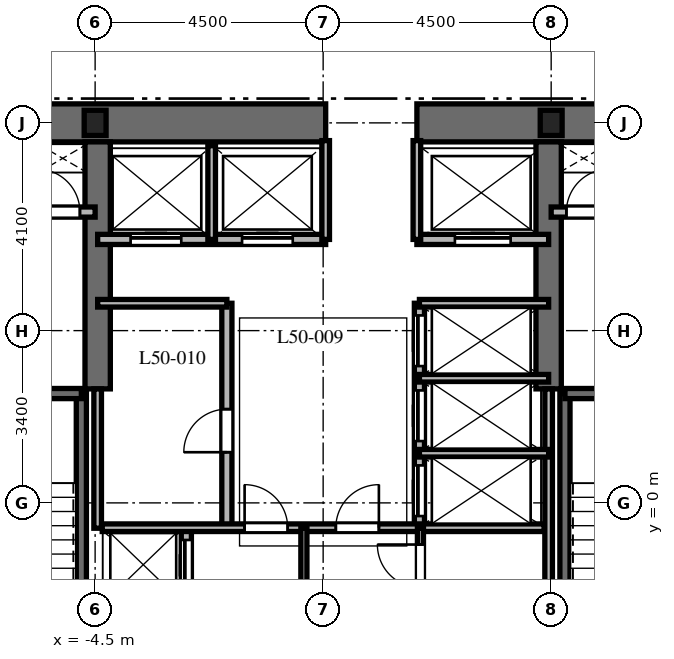
"""IFC4 building model, lengths in metres.
Left out: names, types, materials, properties, quantities, classifications, styles, units other than length and angle.
Written with IfcOpenShell. Run it as: python <this file> out.ifc"""

import sys

from ifc_helpers import new_model, si_unit, direction, frame, frame_2d, origin, origin_2d, place, context, subcontext, project, spatial, rectangle, i_section, extrude, element, fill, save


model = new_model("IFC4")
c1 = context("Model", 3, precision=1e-05, world=origin(), true_north=direction((0.0, 1.0)))
c2 = subcontext(c1, "Body", "Model", "MODEL_VIEW")
j1 = project(units=[si_unit("LENGTHUNIT", "METRE"), si_unit("PLANEANGLEUNIT", "RADIAN")], contexts=[c1])
p1 = place(None, origin())
s1 = spatial("IfcSite", under=j1, at=p1, CompositionType="ELEMENT")
p2 = place(p1, origin())
s2 = spatial("IfcBuilding", under=s1, at=p2, CompositionType="ELEMENT")
p3 = place(p2, frame((0.0, 0.0, 201.5)))
s3 = spatial("IfcBuildingStorey", under=s2, at=p3, CompositionType="ELEMENT", Elevation=201.5)
p4 = place(p3, frame((-9.375, 7.5, 0.0), z_axis=(0.0, 0.0, 1.0), x_axis=(1.0, 0.0, 0.0)))
e1 = element("IfcWall", 1, at=p4, inside=s3, PredefinedType="SHEAR", context=c2, shape_type="SweptSolid", body=[
    extrude(rectangle(XDim=9.425, YDim=0.75, at=frame_2d((4.712, 0.0))), origin(), (0.0, 0.0, 1.0), 5.0),
])
p5 = place(p3, frame((1.85, 7.5, 0.0), z_axis=(0.0, 0.0, 1.0), x_axis=(1.0, 0.0, 0.0)))
e2 = element("IfcWall", 2, at=p5, inside=s3, PredefinedType="SHEAR", context=c2, shape_type="SweptSolid", body=[
    extrude(rectangle(XDim=7.525, YDim=0.75, at=frame_2d((3.762, 0.0))), origin(), (0.0, 0.0, 1.0), 5.0),
])
for number, where, z_axis, x_axis in (
    (3, (-4.45, 2.25, 0.0), (0.0, 0.0, 1.0), (0.0, 1.0, 0.0)),
    (4, (4.45, 2.25, 0.0), (0.0, 0.0, 1.0), (0.0, 1.0, 0.0)),
):
    element("IfcWall", number, at=place(p3, frame(where, z_axis=z_axis, x_axis=x_axis)), inside=s3, PredefinedType="SHEAR", context=c2, shape_type="SweptSolid", body=[
        extrude(rectangle(XDim=4.875, YDim=0.5, at=frame_2d((2.438, 0.0))), origin(), (0.0, 0.0, 1.0), 5.0),
    ])
p6 = place(p3, frame((-4.772, -6.985, 0.0), z_axis=(0.0, 0.0, 1.0), x_axis=(0.0, 1.0, 0.0)))
e5 = element("IfcWall", 5, at=p6, inside=s3, PredefinedType="SHEAR", context=c2, shape_type="SweptSolid", body=[
    extrude(rectangle(XDim=9.143, YDim=0.2, at=frame_2d((4.572, 0.0))), origin(), (0.0, 0.0, 1.0), 5.0),
])
p7 = place(p3, frame((-8.458, 2.158, 0.0), z_axis=(0.0, 0.0, 1.0), x_axis=(1.0, 0.0, 0.0)))
e6 = element("IfcWall", 6, at=p7, inside=s3, PredefinedType="SHEAR", context=c2, shape_type="SweptSolid", body=[
    extrude(rectangle(XDim=3.686, YDim=0.2, at=frame_2d((1.843, 0.0))), origin(), (0.0, 0.0, 1.0), 5.0),
])
p8 = place(p7, frame((1.3, 0.0, 0.0)))
e7 = element("IfcOpeningElement", 7, at=p8, cuts=e6, PredefinedType="OPENING", context=c2, shape_type="SweptSolid", body=[
    extrude(rectangle(XDim=1.0, YDim=2.15, at=frame_2d((0.5, 1.075))), frame((0.0, 0.11, 0.0), z_axis=(0.0, -1.0, 0.0), x_axis=(1.0, 0.0, 0.0)), (0.0, 0.0, 1.0), 0.22),
])
p9 = place(p3, frame((4.772, -6.985, 0.0), z_axis=(0.0, 0.0, 1.0), x_axis=(0.0, 1.0, 0.0)))
e8 = element("IfcWall", 8, at=p9, inside=s3, PredefinedType="SHEAR", context=c2, shape_type="SweptSolid", body=[
    extrude(rectangle(XDim=9.143, YDim=0.2, at=frame_2d((4.572, 0.0))), origin(), (0.0, 0.0, 1.0), 5.0),
])
p10 = place(p3, frame((4.772, 2.158, 0.0), z_axis=(0.0, 0.0, 1.0), x_axis=(1.0, 0.0, 0.0)))
e9 = element("IfcWall", 9, at=p10, inside=s3, PredefinedType="SHEAR", context=c2, shape_type="SweptSolid", body=[
    extrude(rectangle(XDim=3.686, YDim=0.2, at=frame_2d((1.843, 0.0))), origin(), (0.0, 0.0, 1.0), 5.0),
])
p11 = place(p10, frame((1.35, 0.0, 0.0)))
e10 = element("IfcOpeningElement", 10, at=p11, cuts=e9, PredefinedType="OPENING", context=c2, shape_type="SweptSolid", body=[
    extrude(rectangle(XDim=1.0, YDim=2.15, at=frame_2d((0.5, 1.075))), frame((0.0, 0.11, 0.0), z_axis=(0.0, -1.0, 0.0), x_axis=(1.0, 0.0, 0.0)), (0.0, 0.0, 1.0), 0.22),
])
for number, where, z_axis, x_axis in (
    (11, (4.5, 7.5, 0.0), (0.0, 0.0, 1.0), (1.0, 0.0, 0.0)),
    (12, (-4.5, 7.5, 0.0), (0.0, 0.0, 1.0), (1.0, 0.0, 0.0)),
):
    element("IfcColumn", number, at=place(p3, frame(where, z_axis=z_axis, x_axis=x_axis)), inside=s3, PredefinedType="COLUMN", context=c2, shape_type="SweptSolid", body=[
        extrude(i_section(OverallWidth=0.432, OverallDepth=0.498, WebThickness=0.056, FlangeThickness=0.089, at=origin_2d()), origin(), (0.0, 0.0, 1.0), 5.0),
    ])
p12 = place(p3, frame((-8.55, 5.74, 0.0), z_axis=(0.0, 0.0, 1.0), x_axis=(1.0, 0.0, 0.0)))
e13 = element("IfcWall", 13, at=p12, inside=s3, PredefinedType="PARTITIONING", context=c2, shape_type="SweptSolid", body=[
    extrude(rectangle(XDim=4.05, YDim=0.2, at=frame_2d((2.025, 0.0))), origin(), (0.0, 0.0, 1.0), 4.7),
])
p13 = place(p12, frame((0.75, 0.0, 0.0)))
e14 = element("IfcOpeningElement", 14, at=p13, cuts=e13, PredefinedType="OPENING", context=c2, shape_type="SweptSolid", body=[
    extrude(rectangle(XDim=1.1, YDim=2.2, at=frame_2d((0.55, 1.1))), frame((0.0, 0.11, 0.0), z_axis=(0.0, -1.0, 0.0), x_axis=(1.0, 0.0, 0.0)), (0.0, 0.0, 1.0), 0.22),
])
p14 = place(p12, frame((2.9, 0.0, 0.0)))
e15 = element("IfcOpeningElement", 15, at=p14, cuts=e13, PredefinedType="OPENING", context=c2, shape_type="SweptSolid", body=[
    extrude(rectangle(XDim=0.85, YDim=2.03, at=frame_2d((0.425, 1.015))), frame((0.0, 0.11, 0.0), z_axis=(0.0, -1.0, 0.0), x_axis=(1.0, 0.0, 0.0)), (0.0, 0.0, 1.0), 0.22),
])
p15 = place(p3, frame((4.5, 5.74, 0.0), z_axis=(0.0, 0.0, 1.0), x_axis=(1.0, 0.0, 0.0)))
e16 = element("IfcWall", 16, at=p15, inside=s3, PredefinedType="PARTITIONING", context=c2, shape_type="SweptSolid", body=[
    extrude(rectangle(XDim=4.05, YDim=0.2, at=frame_2d((2.025, 0.0))), origin(), (0.0, 0.0, 1.0), 4.7),
])
p16 = place(p15, frame((0.3, 0.0, 0.0)))
e17 = element("IfcOpeningElement", 17, at=p16, cuts=e16, PredefinedType="OPENING", context=c2, shape_type="SweptSolid", body=[
    extrude(rectangle(XDim=0.85, YDim=2.03, at=frame_2d((0.425, 1.015))), frame((0.0, 0.11, 0.0), z_axis=(0.0, -1.0, 0.0), x_axis=(1.0, 0.0, 0.0)), (0.0, 0.0, 1.0), 0.22),
])
p17 = place(p15, frame((2.15, 0.0, 0.0)))
e18 = element("IfcOpeningElement", 18, at=p17, cuts=e16, PredefinedType="OPENING", context=c2, shape_type="SweptSolid", body=[
    extrude(rectangle(XDim=1.1, YDim=2.2, at=frame_2d((0.55, 1.1))), frame((0.0, 0.11, 0.0), z_axis=(0.0, -1.0, 0.0), x_axis=(1.0, 0.0, 0.0)), (0.0, 0.0, 1.0), 0.22),
])
p18 = place(p3, frame((-2.7, -1.972, 0.0), z_axis=(0.0, 0.0, 1.0), x_axis=(0.0, 1.0, 0.0)))
e19 = element("IfcWall", 19, at=p18, inside=s3, PredefinedType="PARTITIONING", context=c2, shape_type="SweptSolid", body=[
    extrude(rectangle(XDim=1.472, YDim=0.2, at=frame_2d((0.736, 0.0))), origin(), (0.0, 0.0, 1.0), 4.7),
])
p19 = place(p18, frame((0.24, 0.0, 0.0)))
e20 = element("IfcOpeningElement", 20, at=p19, cuts=e19, PredefinedType="OPENING", context=c2, shape_type="SweptSolid", body=[
    extrude(rectangle(XDim=1.0, YDim=2.2, at=frame_2d((0.5, 1.1))), frame((0.0, 0.11, 0.0), z_axis=(0.0, -1.0, 0.0), x_axis=(1.0, 0.0, 0.0)), (0.0, 0.0, 1.0), 0.22),
])
p20 = place(p3, frame((-4.45, 5.2, 0.0), z_axis=(0.0, 0.0, 1.0), x_axis=(1.0, 0.0, 0.0)))
e21 = element("IfcWall", 21, at=p20, inside=s3, PredefinedType="PARTITIONING", context=c2, shape_type="SweptSolid", body=[
    extrude(rectangle(XDim=4.5, YDim=0.2, at=frame_2d((2.25, 0.0))), origin(), (0.0, 0.0, 1.0), 4.7),
])
p21 = place(p20, frame((0.65, 0.0, 0.0)))
e22 = element("IfcOpeningElement", 22, at=p21, cuts=e21, PredefinedType="OPENING", context=c2, shape_type="SweptSolid", body=[
    extrude(rectangle(XDim=1.0, YDim=2.2, at=frame_2d((0.5, 1.1))), frame((0.0, 0.11, 0.0), z_axis=(0.0, -1.0, 0.0), x_axis=(1.0, 0.0, 0.0)), (0.0, 0.0, 1.0), 0.22),
])
p22 = place(p20, frame((2.85, 0.0, 0.0)))
e23 = element("IfcOpeningElement", 23, at=p22, cuts=e21, PredefinedType="OPENING", context=c2, shape_type="SweptSolid", body=[
    extrude(rectangle(XDim=1.0, YDim=2.2, at=frame_2d((0.5, 1.1))), frame((0.0, 0.11, 0.0), z_axis=(0.0, -1.0, 0.0), x_axis=(1.0, 0.0, 0.0)), (0.0, 0.0, 1.0), 0.22),
])
p23 = place(p3, frame((1.85, 5.2, 0.0), z_axis=(0.0, 0.0, 1.0), x_axis=(1.0, 0.0, 0.0)))
e24 = element("IfcWall", 24, at=p23, inside=s3, PredefinedType="PARTITIONING", context=c2, shape_type="SweptSolid", body=[
    extrude(rectangle(XDim=2.6, YDim=0.2, at=frame_2d((1.3, 0.0))), origin(), (0.0, 0.0, 1.0), 4.7),
])
p24 = place(p23, frame((0.75, 0.0, 0.0)))
e25 = element("IfcOpeningElement", 25, at=p24, cuts=e24, PredefinedType="OPENING", context=c2, shape_type="SweptSolid", body=[
    extrude(rectangle(XDim=1.1, YDim=2.2, at=frame_2d((0.55, 1.1))), frame((0.0, 0.11, 0.0), z_axis=(0.0, -1.0, 0.0), x_axis=(1.0, 0.0, 0.0)), (0.0, 0.0, 1.0), 0.22),
])
p25 = place(p3, frame((-2.2, 5.2, 0.0), z_axis=(0.0, 0.0, 1.0), x_axis=(0.0, 1.0, 0.0)))
e26 = element("IfcWall", 26, at=p25, inside=s3, PredefinedType="PARTITIONING", context=c2, shape_type="SweptSolid", body=[
    extrude(rectangle(XDim=1.85, YDim=0.15, at=frame_2d((0.925, 0.0))), origin(), (0.0, 0.0, 1.0), 4.7),
])
for number, where, z_axis, x_axis in (
    (27, (0.05, 5.2, 0.0), (0.0, 0.0, 1.0), (0.0, 1.0, 0.0)),
    (28, (1.85, 5.2, 0.0), (0.0, 0.0, 1.0), (0.0, 1.0, 0.0)),
):
    element("IfcWall", number, at=place(p3, frame(where, z_axis=z_axis, x_axis=x_axis)), inside=s3, PredefinedType="PARTITIONING", context=c2, shape_type="SweptSolid", body=[
        extrude(rectangle(XDim=1.95, YDim=0.15, at=frame_2d((0.975, 0.0))), origin(), (0.0, 0.0, 1.0), 4.7),
    ])
p26 = place(p3, frame((-4.45, -0.5, 0.0), z_axis=(0.0, 0.0, 1.0), x_axis=(0.0, 1.0, 0.0)))
e29 = element("IfcWall", 29, at=p26, inside=s3, PredefinedType="PARTITIONING", context=c2, shape_type="SweptSolid", body=[
    extrude(rectangle(XDim=2.75, YDim=0.15, at=frame_2d((1.375, 0.0))), origin(), (0.0, 0.0, 1.0), 4.7),
])
p27 = place(p3, frame((4.45, -1.972, 0.0), z_axis=(0.0, 0.0, 1.0), x_axis=(0.0, 1.0, 0.0)))
e30 = element("IfcWall", 30, at=p27, inside=s3, PredefinedType="PARTITIONING", context=c2, shape_type="SweptSolid", body=[
    extrude(rectangle(XDim=4.222, YDim=0.15, at=frame_2d((2.111, 0.0))), origin(), (0.0, 0.0, 1.0), 4.7),
])
p28 = place(p3, frame((-1.9, -0.5, 0.0), z_axis=(0.0, 0.0, 1.0), x_axis=(0.0, 1.0, 0.0)))
e31 = element("IfcWall", 31, at=p28, inside=s3, PredefinedType="PARTITIONING", context=c2, shape_type="SweptSolid", body=[
    extrude(rectangle(XDim=4.44, YDim=0.2, at=frame_2d((2.22, 0.0))), origin(), (0.0, 0.0, 1.0), 4.7),
])
p29 = place(p28, frame((1.5, 0.0, 0.0)))
e32 = element("IfcOpeningElement", 32, at=p29, cuts=e31, PredefinedType="OPENING", context=c2, shape_type="SweptSolid", body=[
    extrude(rectangle(XDim=0.85, YDim=2.03, at=frame_2d((0.425, 1.015))), frame((0.0, 0.11, 0.0), z_axis=(0.0, -1.0, 0.0), x_axis=(1.0, 0.0, 0.0)), (0.0, 0.0, 1.0), 0.22),
])
p30 = place(p3, frame((-4.45, 3.94, 0.0), z_axis=(0.0, 0.0, 1.0), x_axis=(1.0, 0.0, 0.0)))
e33 = element("IfcWall", 33, at=p30, inside=s3, PredefinedType="PARTITIONING", context=c2, shape_type="SweptSolid", body=[
    extrude(rectangle(XDim=2.55, YDim=0.15, at=frame_2d((1.275, 0.0))), origin(), (0.0, 0.0, 1.0), 4.7),
])
p31 = place(p3, frame((1.9, -0.5, 0.0), z_axis=(0.0, 0.0, 1.0), x_axis=(0.0, 1.0, 0.0)))
e34 = element("IfcWall", 34, at=p31, inside=s3, PredefinedType="PARTITIONING", context=c2, shape_type="SweptSolid", body=[
    extrude(rectangle(XDim=4.44, YDim=0.2, at=frame_2d((2.22, 0.0))), origin(), (0.0, 0.0, 1.0), 4.7),
])
p32 = place(p31, frame((0.24, 0.0, 0.0)))
e35 = element("IfcOpeningElement", 35, at=p32, cuts=e34, PredefinedType="OPENING", context=c2, shape_type="SweptSolid", body=[
    extrude(rectangle(XDim=1.0, YDim=2.2, at=frame_2d((0.5, 1.1))), frame((0.0, 0.11, 0.0), z_axis=(0.0, -1.0, 0.0), x_axis=(1.0, 0.0, 0.0)), (0.0, 0.0, 1.0), 0.22),
])
p33 = place(p31, frame((1.72, 0.0, 0.0)))
e36 = element("IfcOpeningElement", 36, at=p33, cuts=e34, PredefinedType="OPENING", context=c2, shape_type="SweptSolid", body=[
    extrude(rectangle(XDim=1.0, YDim=2.2, at=frame_2d((0.5, 1.1))), frame((0.0, 0.11, 0.0), z_axis=(0.0, -1.0, 0.0), x_axis=(1.0, 0.0, 0.0)), (0.0, 0.0, 1.0), 0.22),
])
p34 = place(p31, frame((3.2, 0.0, 0.0)))
e37 = element("IfcOpeningElement", 37, at=p34, cuts=e34, PredefinedType="OPENING", context=c2, shape_type="SweptSolid", body=[
    extrude(rectangle(XDim=1.0, YDim=2.2, at=frame_2d((0.5, 1.1))), frame((0.0, 0.11, 0.0), z_axis=(0.0, -1.0, 0.0), x_axis=(1.0, 0.0, 0.0)), (0.0, 0.0, 1.0), 0.22),
])
for number, where, z_axis, x_axis in (
    (38, (1.9, 3.94, 0.0), (0.0, 0.0, 1.0), (1.0, 0.0, 0.0)),
    (39, (1.9, 0.98, 0.0), (0.0, 0.0, 1.0), (1.0, 0.0, 0.0)),
    (40, (1.9, 2.46, 0.0), (0.0, 0.0, 1.0), (1.0, 0.0, 0.0)),
):
    element("IfcWall", number, at=place(p3, frame(where, z_axis=z_axis, x_axis=x_axis)), inside=s3, PredefinedType="PARTITIONING", context=c2, shape_type="SweptSolid", body=[
        extrude(rectangle(XDim=2.55, YDim=0.15, at=frame_2d((1.275, 0.0))), origin(), (0.0, 0.0, 1.0), 4.7),
    ])
p35 = place(p3, frame((-4.36, -0.49, 0.0), z_axis=(0.0, 0.0, 1.0), x_axis=(1.0, 0.0, 0.0)))
e41 = element("IfcWall", 41, at=p35, inside=s3, PredefinedType="PARTITIONING", context=c2, shape_type="SweptSolid", body=[
    extrude(rectangle(XDim=8.72, YDim=0.15, at=frame_2d((4.36, 0.0))), origin(), (0.0, 0.0, 1.0), 4.7),
])
p36 = place(p35, frame((2.81, 0.0, 0.0)))
e42 = element("IfcOpeningElement", 42, at=p36, cuts=e41, PredefinedType="OPENING", context=c2, shape_type="SweptSolid", body=[
    extrude(rectangle(XDim=0.85, YDim=2.03, at=frame_2d((0.425, 1.015))), frame((0.0, 0.085, 0.0), z_axis=(0.0, -1.0, 0.0), x_axis=(1.0, 0.0, 0.0)), (0.0, 0.0, 1.0), 0.17),
])
p37 = place(p35, frame((4.61, 0.0, 0.0)))
e43 = element("IfcOpeningElement", 43, at=p37, cuts=e41, PredefinedType="OPENING", context=c2, shape_type="SweptSolid", body=[
    extrude(rectangle(XDim=0.85, YDim=2.03, at=frame_2d((0.425, 1.015))), frame((0.0, 0.085, 0.0), z_axis=(0.0, -1.0, 0.0), x_axis=(1.0, 0.0, 0.0)), (0.0, 0.0, 1.0), 0.17),
])
p38 = place(p3, frame((-0.38, -1.972, 0.0), z_axis=(0.0, 0.0, 1.0), x_axis=(0.0, 1.0, 0.0)))
e44 = element("IfcWall", 44, at=p38, inside=s3, PredefinedType="PARTITIONING", context=c2, shape_type="SweptSolid", body=[
    extrude(rectangle(XDim=1.472, YDim=0.12, at=frame_2d((0.736, 0.0))), origin(), (0.0, 0.0, 1.0), 4.7),
])
p39 = place(p3, frame((1.92, -1.972, 0.0), z_axis=(0.0, 0.0, 1.0), x_axis=(0.0, 1.0, 0.0)))
e45 = element("IfcWall", 45, at=p39, inside=s3, PredefinedType="PARTITIONING", context=c2, shape_type="SweptSolid", body=[
    extrude(rectangle(XDim=1.472, YDim=0.12, at=frame_2d((0.736, 0.0))), origin(), (0.0, 0.0, 1.0), 4.7),
])
p40 = place(p39, frame((0.3, 0.0, 0.0)))
e46 = element("IfcOpeningElement", 46, at=p40, cuts=e45, PredefinedType="OPENING", context=c2, shape_type="SweptSolid", body=[
    extrude(rectangle(XDim=0.85, YDim=2.03, at=frame_2d((0.425, 1.015))), frame((0.0, 0.07, 0.0), z_axis=(0.0, -1.0, 0.0), x_axis=(1.0, 0.0, 0.0)), (0.0, 0.0, 1.0), 0.14),
])
p41 = place(p14, origin())
e47 = element("IfcDoor", 47, at=p41, inside=s3, OperationType="SINGLE_SWING_LEFT", PredefinedType="DOOR", context=c2, shape_type="SweptSolid", body=[
    extrude(rectangle(XDim=0.85, YDim=2.03, at=frame_2d((0.425, 1.015))), frame((0.0, 0.025, 0.0), z_axis=(0.0, -1.0, 0.0), x_axis=(1.0, 0.0, 0.0)), (0.0, 0.0, 1.0), 0.05),
])
fill(e15, e47)
p42 = place(p16, origin())
e48 = element("IfcDoor", 48, at=p42, inside=s3, OperationType="SINGLE_SWING_RIGHT", PredefinedType="DOOR", context=c2, shape_type="SweptSolid", body=[
    extrude(rectangle(XDim=0.85, YDim=2.03, at=frame_2d((0.425, 1.015))), frame((0.0, 0.025, 0.0), z_axis=(0.0, -1.0, 0.0), x_axis=(1.0, 0.0, 0.0)), (0.0, 0.0, 1.0), 0.05),
])
fill(e17, e48)
p43 = place(p19, origin())
e49 = element("IfcDoor", 49, at=p43, inside=s3, OperationType="SLIDING_TO_LEFT", PredefinedType="DOOR", context=c2, shape_type="SweptSolid", body=[
    extrude(rectangle(XDim=1.0, YDim=2.2, at=frame_2d((0.5, 1.1))), frame((0.0, 0.025, 0.0), z_axis=(0.0, -1.0, 0.0), x_axis=(1.0, 0.0, 0.0)), (0.0, 0.0, 1.0), 0.05),
])
fill(e20, e49)
p44 = place(p21, origin())
e50 = element("IfcDoor", 50, at=p44, inside=s3, OperationType="SLIDING_TO_LEFT", PredefinedType="DOOR", context=c2, shape_type="SweptSolid", body=[
    extrude(rectangle(XDim=1.0, YDim=2.2, at=frame_2d((0.5, 1.1))), frame((0.0, 0.025, 0.0), z_axis=(0.0, -1.0, 0.0), x_axis=(1.0, 0.0, 0.0)), (0.0, 0.0, 1.0), 0.05),
])
fill(e22, e50)
p45 = place(p22, origin())
e51 = element("IfcDoor", 51, at=p45, inside=s3, OperationType="SLIDING_TO_RIGHT", PredefinedType="DOOR", context=c2, shape_type="SweptSolid", body=[
    extrude(rectangle(XDim=1.0, YDim=2.2, at=frame_2d((0.5, 1.1))), frame((0.0, 0.025, 0.0), z_axis=(0.0, -1.0, 0.0), x_axis=(1.0, 0.0, 0.0)), (0.0, 0.0, 1.0), 0.05),
])
fill(e23, e51)
p46 = place(p24, origin())
e52 = element("IfcDoor", 52, at=p46, inside=s3, OperationType="SLIDING_TO_RIGHT", PredefinedType="DOOR", context=c2, shape_type="SweptSolid", body=[
    extrude(rectangle(XDim=1.1, YDim=2.2, at=frame_2d((0.55, 1.1))), frame((0.0, 0.025, 0.0), z_axis=(0.0, -1.0, 0.0), x_axis=(1.0, 0.0, 0.0)), (0.0, 0.0, 1.0), 0.05),
])
fill(e25, e52)
p47 = place(p29, origin())
e53 = element("IfcDoor", 53, at=p47, inside=s3, OperationType="SINGLE_SWING_LEFT", PredefinedType="DOOR", context=c2, shape_type="SweptSolid", body=[
    extrude(rectangle(XDim=0.85, YDim=2.03, at=frame_2d((0.425, 1.015))), frame((0.0, 0.025, 0.0), z_axis=(0.0, -1.0, 0.0), x_axis=(1.0, 0.0, 0.0)), (0.0, 0.0, 1.0), 0.05),
])
fill(e32, e53)
p48 = place(p32, origin())
e54 = element("IfcDoor", 54, at=p48, inside=s3, OperationType="SLIDING_TO_RIGHT", PredefinedType="DOOR", context=c2, shape_type="SweptSolid", body=[
    extrude(rectangle(XDim=1.0, YDim=2.2, at=frame_2d((0.5, 1.1))), frame((0.0, 0.025, 0.0), z_axis=(0.0, -1.0, 0.0), x_axis=(1.0, 0.0, 0.0)), (0.0, 0.0, 1.0), 0.05),
])
fill(e35, e54)
p49 = place(p33, origin())
e55 = element("IfcDoor", 55, at=p49, inside=s3, OperationType="SLIDING_TO_RIGHT", PredefinedType="DOOR", context=c2, shape_type="SweptSolid", body=[
    extrude(rectangle(XDim=1.0, YDim=2.2, at=frame_2d((0.5, 1.1))), frame((0.0, 0.025, 0.0), z_axis=(0.0, -1.0, 0.0), x_axis=(1.0, 0.0, 0.0)), (0.0, 0.0, 1.0), 0.05),
])
fill(e36, e55)
p50 = place(p34, origin())
e56 = element("IfcDoor", 56, at=p50, inside=s3, OperationType="SLIDING_TO_RIGHT", PredefinedType="DOOR", context=c2, shape_type="SweptSolid", body=[
    extrude(rectangle(XDim=1.0, YDim=2.2, at=frame_2d((0.5, 1.1))), frame((0.0, 0.025, 0.0), z_axis=(0.0, -1.0, 0.0), x_axis=(1.0, 0.0, 0.0)), (0.0, 0.0, 1.0), 0.05),
])
fill(e37, e56)
p51 = place(p36, origin())
e57 = element("IfcDoor", 57, at=p51, inside=s3, OperationType="SINGLE_SWING_LEFT", PredefinedType="DOOR", context=c2, shape_type="SweptSolid", body=[
    extrude(rectangle(XDim=0.85, YDim=2.03, at=frame_2d((0.425, 1.015))), frame((0.0, 0.025, 0.0), z_axis=(0.0, -1.0, 0.0), x_axis=(1.0, 0.0, 0.0)), (0.0, 0.0, 1.0), 0.05),
])
fill(e42, e57)
p52 = place(p37, origin())
e58 = element("IfcDoor", 58, at=p52, inside=s3, OperationType="SINGLE_SWING_RIGHT", PredefinedType="DOOR", context=c2, shape_type="SweptSolid", body=[
    extrude(rectangle(XDim=0.85, YDim=2.03, at=frame_2d((0.425, 1.015))), frame((0.0, 0.025, 0.0), z_axis=(0.0, -1.0, 0.0), x_axis=(1.0, 0.0, 0.0)), (0.0, 0.0, 1.0), 0.05),
])
fill(e43, e58)
p53 = place(p40, origin())
e59 = element("IfcDoor", 59, at=p53, inside=s3, OperationType="SINGLE_SWING_RIGHT", PredefinedType="DOOR", context=c2, shape_type="SweptSolid", body=[
    extrude(rectangle(XDim=0.85, YDim=2.03, at=frame_2d((0.425, 1.015))), frame((0.0, 0.025, 0.0), z_axis=(0.0, -1.0, 0.0), x_axis=(1.0, 0.0, 0.0)), (0.0, 0.0, 1.0), 0.05),
])
fill(e46, e59)
save(model, sys.argv[1])
